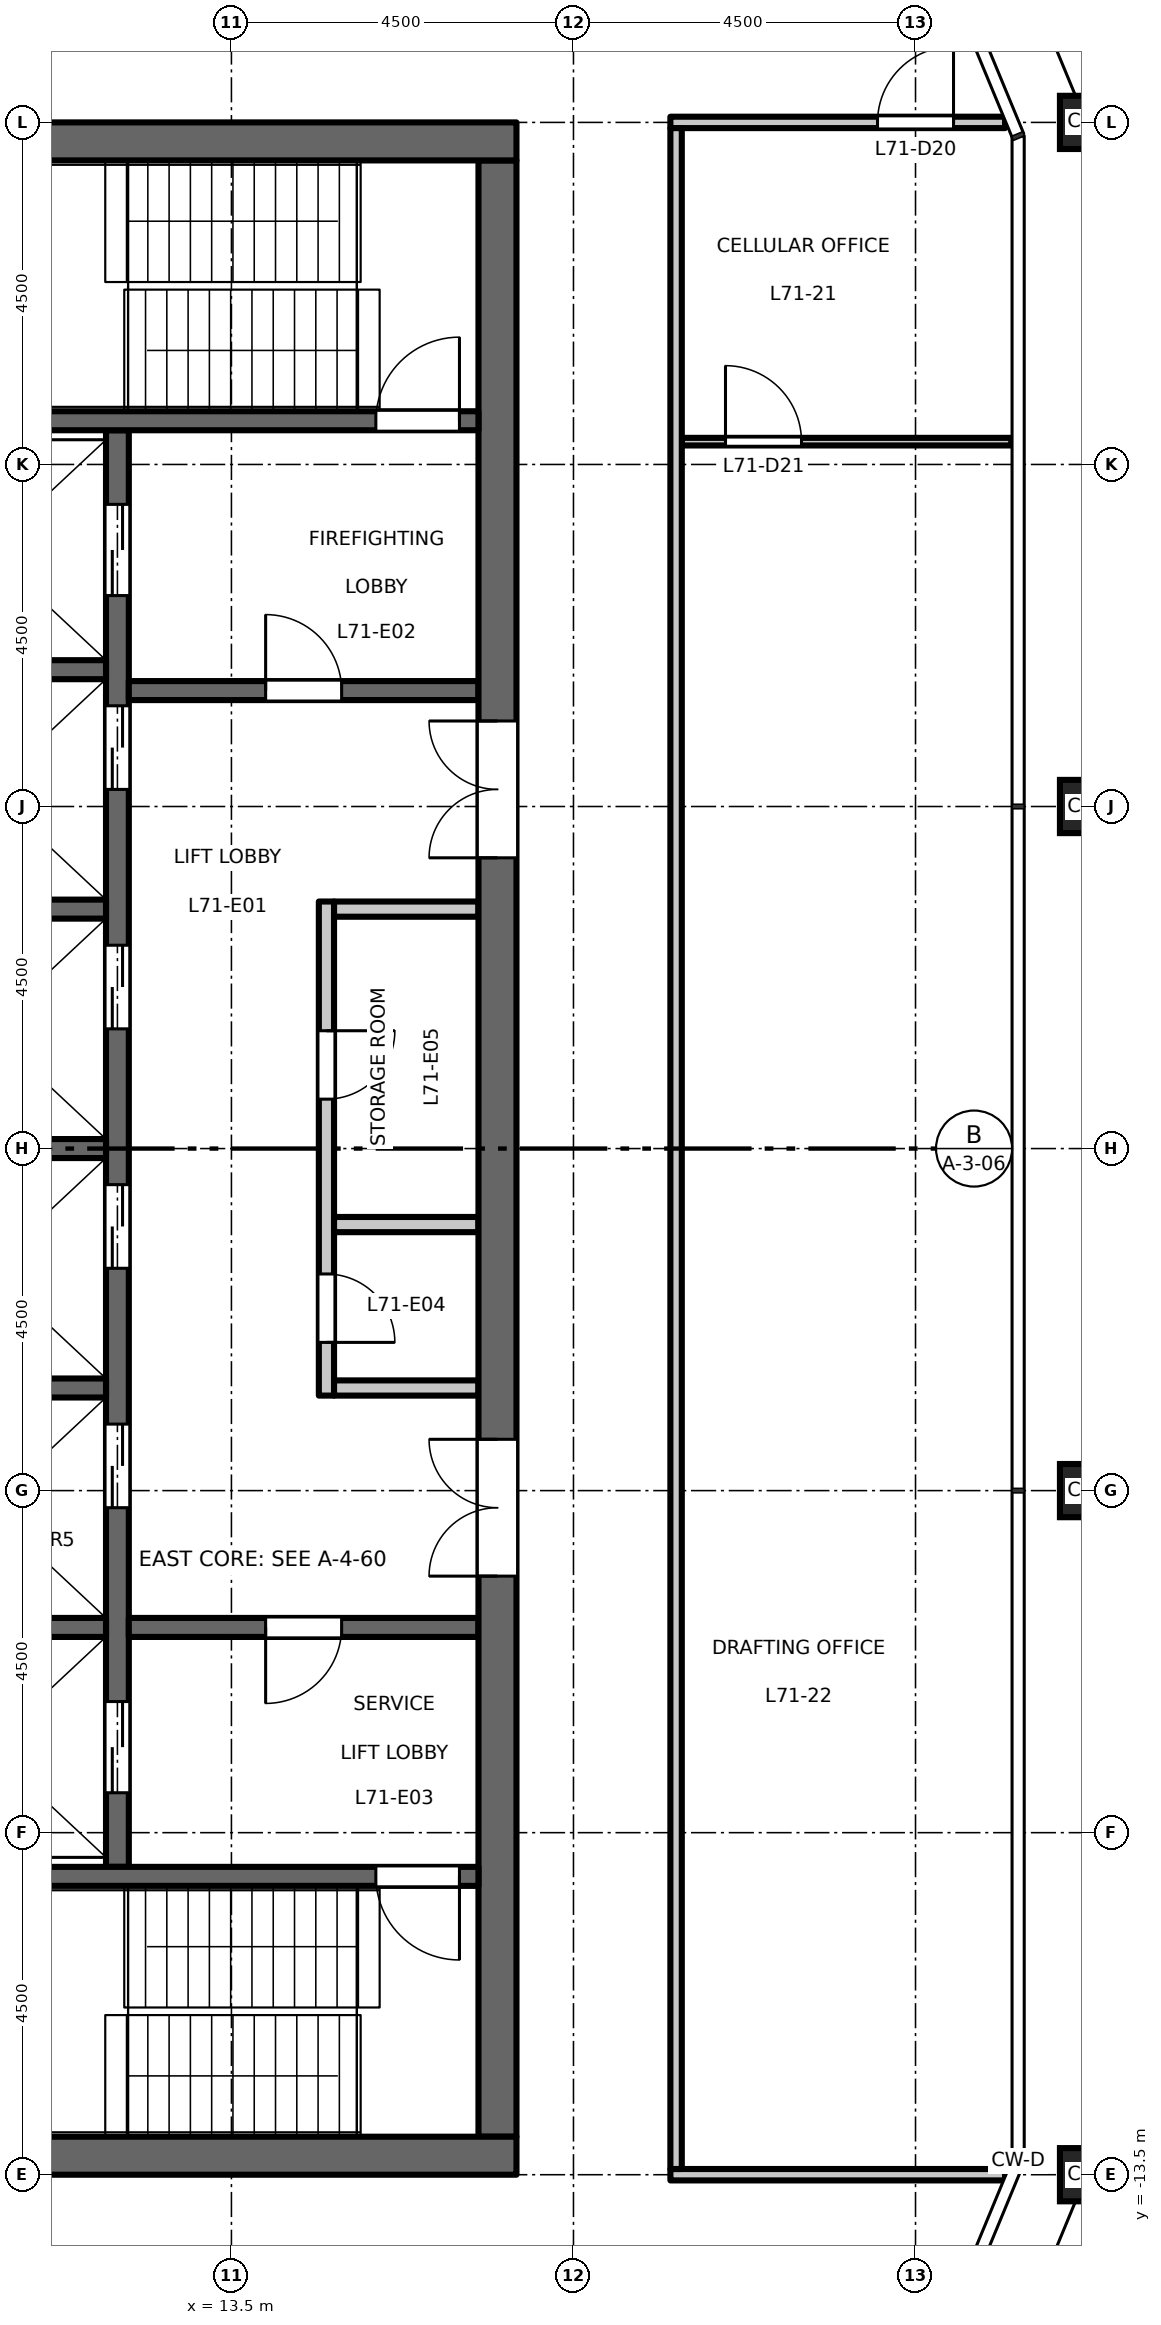
"""IFC4 building model, lengths in metres.
Left out: names, types, materials, properties, quantities, classifications, styles, units other than length and angle.
Written with IfcOpenShell. Run it as: python <this file> out.ifc"""

import sys

from ifc_helpers import new_model, si_unit, direction, frame, frame_2d, origin, origin_2d, place, context, subcontext, project, spatial, rectangle, hollow_rectangle, extrude, element, fill, save


model = new_model("IFC4")
c1 = context("Model", 3, precision=1e-05, world=origin(), true_north=direction((0.0, 1.0)))
c2 = subcontext(c1, "Body", "Model", "MODEL_VIEW")
j1 = project(units=[si_unit("LENGTHUNIT", "METRE"), si_unit("PLANEANGLEUNIT", "RADIAN")], contexts=[c1])
p1 = place(None, origin())
s1 = spatial("IfcSite", under=j1, at=p1, CompositionType="ELEMENT")
p2 = place(p1, origin())
s2 = spatial("IfcBuilding", under=s1, at=p2, CompositionType="ELEMENT")
p3 = place(p2, frame((0.0, 0.0, 330.2)))
s3 = spatial("IfcBuildingStorey", under=s2, at=p3, CompositionType="ELEMENT", Elevation=330.2)
for number, where, z_axis, x_axis in (
    (1, (24.75, -13.5, 0.0), (0.0, 0.0, 1.0), (1.0, 0.0, 0.0)),
    (2, (24.75, -4.5, 0.0), (0.0, 0.0, 1.0), (1.0, 0.0, 0.0)),
    (3, (24.75, 4.5, 0.0), (0.0, 0.0, 1.0), (1.0, 0.0, 0.0)),
    (4, (24.75, 13.5, 0.0), (0.0, 0.0, 1.0), (1.0, 0.0, 0.0)),
):
    element("IfcColumn", number, at=place(p3, frame(where, z_axis=z_axis, x_axis=x_axis)), inside=s3, PredefinedType="COLUMN", context=c2, shape_type="SweptSolid", body=[
        extrude(hollow_rectangle(XDim=0.7, YDim=0.7, WallThickness=0.036, at=origin_2d()), origin(), (0.0, 0.0, 1.0), 4.5),
    ])
p4 = place(p3, frame((14.75, -3.25, 0.0), z_axis=(0.0, 0.0, 1.0), x_axis=(0.0, 1.0, 0.0)))
e5 = element("IfcWall", 5, at=p4, inside=s3, PredefinedType="PARTITIONING", context=c2, shape_type="SweptSolid", body=[
    extrude(rectangle(XDim=6.5, YDim=0.2, at=frame_2d((3.25, 0.0))), origin(), (0.0, 0.0, 1.0), 4.35),
])
p5 = place(p4, frame((0.7, 0.0, 0.0)))
e6 = element("IfcOpeningElement", 6, at=p5, cuts=e5, PredefinedType="OPENING", context=c2, shape_type="SweptSolid", body=[
    extrude(rectangle(XDim=0.9, YDim=2.1, at=frame_2d((0.45, 1.05))), frame((0.0, 0.11, 0.0), z_axis=(0.0, -1.0, 0.0), x_axis=(1.0, 0.0, 0.0)), (0.0, 0.0, 1.0), 0.22),
])
p6 = place(p4, frame((3.9, 0.0, 0.0)))
e7 = element("IfcOpeningElement", 7, at=p6, cuts=e5, PredefinedType="OPENING", context=c2, shape_type="SweptSolid", body=[
    extrude(rectangle(XDim=0.9, YDim=2.1, at=frame_2d((0.45, 1.05))), frame((0.0, 0.11, 0.0), z_axis=(0.0, -1.0, 0.0), x_axis=(1.0, 0.0, 0.0)), (0.0, 0.0, 1.0), 0.22),
])
for number, where, z_axis, x_axis in (
    (8, (14.85, 3.15, 0.0), (0.0, 0.0, 1.0), (1.0, 0.0, 0.0)),
    (9, (14.85, -3.15, 0.0), (0.0, 0.0, 1.0), (1.0, 0.0, 0.0)),
    (10, (14.85, -1.0, 0.0), (0.0, 0.0, 1.0), (1.0, 0.0, 0.0)),
):
    element("IfcWall", number, at=place(p3, frame(where, z_axis=z_axis, x_axis=x_axis)), inside=s3, PredefinedType="PARTITIONING", context=c2, shape_type="SweptSolid", body=[
        extrude(rectangle(XDim=1.9, YDim=0.2, at=frame_2d((0.95, 0.0))), origin(), (0.0, 0.0, 1.0), 4.35),
    ])
p7 = place(p3, frame((12.0, -9.45, 0.0), z_axis=(0.0, 0.0, 1.0), x_axis=(0.0, 1.0, 0.0)))
e11 = element("IfcWall", 11, at=p7, inside=s3, PredefinedType="SHEAR", context=c2, shape_type="SweptSolid", body=[
    extrude(rectangle(XDim=18.9, YDim=0.3, at=frame_2d((9.45, 0.0))), origin(), (0.0, 0.0, 1.0), 4.35),
])
p8 = place(p7, frame((4.725, 0.0, 0.0)))
e12 = element("IfcOpeningElement", 12, at=p8, cuts=e11, PredefinedType="OPENING", context=c2, shape_type="SweptSolid", body=[
    extrude(rectangle(XDim=1.1, YDim=2.1, at=frame_2d((0.55, 1.05))), frame((0.0, 0.16, 0.0), z_axis=(0.0, -1.0, 0.0), x_axis=(1.0, 0.0, 0.0)), (0.0, 0.0, 1.0), 0.32),
])
p9 = place(p7, frame((7.875, 0.0, 0.0)))
e13 = element("IfcOpeningElement", 13, at=p9, cuts=e11, PredefinedType="OPENING", context=c2, shape_type="SweptSolid", body=[
    extrude(rectangle(XDim=1.1, YDim=2.1, at=frame_2d((0.55, 1.05))), frame((0.0, 0.16, 0.0), z_axis=(0.0, -1.0, 0.0), x_axis=(1.0, 0.0, 0.0)), (0.0, 0.0, 1.0), 0.32),
])
p10 = place(p7, frame((11.025, 0.0, 0.0)))
e14 = element("IfcOpeningElement", 14, at=p10, cuts=e11, PredefinedType="OPENING", context=c2, shape_type="SweptSolid", body=[
    extrude(rectangle(XDim=1.1, YDim=2.1, at=frame_2d((0.55, 1.05))), frame((0.0, 0.16, 0.0), z_axis=(0.0, -1.0, 0.0), x_axis=(1.0, 0.0, 0.0)), (0.0, 0.0, 1.0), 0.32),
])
p11 = place(p7, frame((14.175, 0.0, 0.0)))
e15 = element("IfcOpeningElement", 15, at=p11, cuts=e11, PredefinedType="OPENING", context=c2, shape_type="SweptSolid", body=[
    extrude(rectangle(XDim=1.1, YDim=2.1, at=frame_2d((0.55, 1.05))), frame((0.0, 0.16, 0.0), z_axis=(0.0, -1.0, 0.0), x_axis=(1.0, 0.0, 0.0)), (0.0, 0.0, 1.0), 0.32),
])
p12 = place(p7, frame((16.725, 0.0, 0.0)))
e16 = element("IfcOpeningElement", 16, at=p12, cuts=e11, PredefinedType="OPENING", context=c2, shape_type="SweptSolid", body=[
    extrude(rectangle(XDim=1.2, YDim=2.1, at=frame_2d((0.6, 1.05))), frame((0.0, 0.16, 0.0), z_axis=(0.0, -1.0, 0.0), x_axis=(1.0, 0.0, 0.0)), (0.0, 0.0, 1.0), 0.32),
])
p13 = place(p7, frame((0.975, 0.0, 0.0)))
e17 = element("IfcOpeningElement", 17, at=p13, cuts=e11, PredefinedType="OPENING", context=c2, shape_type="SweptSolid", body=[
    extrude(rectangle(XDim=1.2, YDim=2.1, at=frame_2d((0.6, 1.05))), frame((0.0, 0.16, 0.0), z_axis=(0.0, -1.0, 0.0), x_axis=(1.0, 0.0, 0.0)), (0.0, 0.0, 1.0), 0.32),
])
p14 = place(p3, frame((12.15, 6.025, 0.0), z_axis=(0.0, 0.0, 1.0), x_axis=(1.0, 0.0, 0.0)))
e18 = element("IfcWall", 18, at=p14, inside=s3, PredefinedType="SHEAR", context=c2, shape_type="SweptSolid", body=[
    extrude(rectangle(XDim=4.6, YDim=0.25, at=frame_2d((2.3, 0.0))), origin(), (0.0, 0.0, 1.0), 4.35),
])
p15 = place(p14, frame((1.8, 0.0, 0.0)))
e19 = element("IfcOpeningElement", 19, at=p15, cuts=e18, PredefinedType="OPENING", context=c2, shape_type="SweptSolid", body=[
    extrude(rectangle(XDim=1.0, YDim=2.1, at=frame_2d((0.5, 1.05))), frame((0.0, 0.135, 0.0), z_axis=(0.0, -1.0, 0.0), x_axis=(1.0, 0.0, 0.0)), (0.0, 0.0, 1.0), 0.27),
])
p16 = place(p3, frame((12.15, -6.3, 0.0), z_axis=(0.0, 0.0, 1.0), x_axis=(1.0, 0.0, 0.0)))
e20 = element("IfcWall", 20, at=p16, inside=s3, PredefinedType="SHEAR", context=c2, shape_type="SweptSolid", body=[
    extrude(rectangle(XDim=4.6, YDim=0.25, at=frame_2d((2.3, 0.0))), origin(), (0.0, 0.0, 1.0), 4.35),
])
p17 = place(p16, frame((1.8, 0.0, 0.0)))
e21 = element("IfcOpeningElement", 21, at=p17, cuts=e20, PredefinedType="OPENING", context=c2, shape_type="SweptSolid", body=[
    extrude(rectangle(XDim=1.0, YDim=2.1, at=frame_2d((0.5, 1.05))), frame((0.0, 0.135, 0.0), z_axis=(0.0, -1.0, 0.0), x_axis=(1.0, 0.0, 0.0)), (0.0, 0.0, 1.0), 0.27),
])
p18 = place(p3, frame((17.0, -13.0, 0.0), z_axis=(0.0, 0.0, 1.0), x_axis=(0.0, 1.0, 0.0)))
e22 = element("IfcWall", 22, at=p18, inside=s3, PredefinedType="SHEAR", context=c2, shape_type="SweptSolid", body=[
    extrude(rectangle(XDim=26.0, YDim=0.5, at=frame_2d((13.0, 0.0))), origin(), (0.0, 0.0, 1.0), 4.35),
])
p19 = place(p18, frame((16.825, 0.0, 0.0)))
e23 = element("IfcOpeningElement", 23, at=p19, cuts=e22, PredefinedType="OPENING", context=c2, shape_type="SweptSolid", body=[
    extrude(rectangle(XDim=1.8, YDim=2.1, at=frame_2d((0.9, 1.05))), frame((0.0, 0.26, 0.0), z_axis=(0.0, -1.0, 0.0), x_axis=(1.0, 0.0, 0.0)), (0.0, 0.0, 1.0), 0.52),
])
p20 = place(p18, frame((7.375, 0.0, 0.0)))
e24 = element("IfcOpeningElement", 24, at=p20, cuts=e22, PredefinedType="OPENING", context=c2, shape_type="SweptSolid", body=[
    extrude(rectangle(XDim=1.8, YDim=2.1, at=frame_2d((0.9, 1.05))), frame((0.0, 0.26, 0.0), z_axis=(0.0, -1.0, 0.0), x_axis=(1.0, 0.0, 0.0)), (0.0, 0.0, 1.0), 0.52),
])
for number, where, z_axis, x_axis in (
    (25, (8.75, 0.0, 0.0), (0.0, 0.0, 1.0), (1.0, 0.0, 0.0)),
    (26, (8.75, 3.15, 0.0), (0.0, 0.0, 1.0), (1.0, 0.0, 0.0)),
    (27, (8.75, 6.3, 0.0), (0.0, 0.0, 1.0), (1.0, 0.0, 0.0)),
    (28, (8.75, -3.15, 0.0), (0.0, 0.0, 1.0), (1.0, 0.0, 0.0)),
    (29, (8.75, -6.3, 0.0), (0.0, 0.0, 1.0), (1.0, 0.0, 0.0)),
):
    element("IfcWall", number, at=place(p3, frame(where, z_axis=z_axis, x_axis=x_axis)), inside=s3, PredefinedType="SHEAR", context=c2, shape_type="SweptSolid", body=[
        extrude(rectangle(XDim=3.1, YDim=0.25, at=frame_2d((1.55, 0.0))), origin(), (0.0, 0.0, 1.0), 4.35),
    ])
p21 = place(p3, frame((8.75, 9.575, 0.0), z_axis=(0.0, 0.0, 1.0), x_axis=(1.0, 0.0, 0.0)))
e30 = element("IfcWall", 30, at=p21, inside=s3, PredefinedType="SHEAR", context=c2, shape_type="SweptSolid", body=[
    extrude(rectangle(XDim=8.0, YDim=0.25, at=frame_2d((4.0, 0.0))), origin(), (0.0, 0.0, 1.0), 4.35),
])
p22 = place(p21, frame((6.65, 0.0, 0.0)))
e31 = element("IfcOpeningElement", 31, at=p22, cuts=e30, PredefinedType="OPENING", context=c2, shape_type="SweptSolid", body=[
    extrude(rectangle(XDim=1.1, YDim=2.1, at=frame_2d((0.55, 1.05))), frame((0.0, 0.135, 0.0), z_axis=(0.0, -1.0, 0.0), x_axis=(1.0, 0.0, 0.0)), (0.0, 0.0, 1.0), 0.27),
])
p23 = place(p3, frame((8.75, -9.575, 0.0), z_axis=(0.0, 0.0, 1.0), x_axis=(1.0, 0.0, 0.0)))
e32 = element("IfcWall", 32, at=p23, inside=s3, PredefinedType="SHEAR", context=c2, shape_type="SweptSolid", body=[
    extrude(rectangle(XDim=8.0, YDim=0.25, at=frame_2d((4.0, 0.0))), origin(), (0.0, 0.0, 1.0), 4.35),
])
p24 = place(p23, frame((6.65, 0.0, 0.0)))
e33 = element("IfcOpeningElement", 33, at=p24, cuts=e32, PredefinedType="OPENING", context=c2, shape_type="SweptSolid", body=[
    extrude(rectangle(XDim=1.1, YDim=2.1, at=frame_2d((0.55, 1.05))), frame((0.0, 0.135, 0.0), z_axis=(0.0, -1.0, 0.0), x_axis=(1.0, 0.0, 0.0)), (0.0, 0.0, 1.0), 0.27),
])
for number, where, z_axis, x_axis in (
    (34, (8.25, 13.25, 0.0), (0.0, 0.0, 1.0), (1.0, 0.0, 0.0)),
    (35, (8.25, -13.25, 0.0), (0.0, 0.0, 1.0), (1.0, 0.0, 0.0)),
):
    element("IfcWall", number, at=place(p3, frame(where, z_axis=z_axis, x_axis=x_axis)), inside=s3, PredefinedType="SHEAR", context=c2, shape_type="SweptSolid", body=[
        extrude(rectangle(XDim=9.0, YDim=0.5, at=frame_2d((4.5, 0.0))), origin(), (0.0, 0.0, 1.0), 4.35),
    ])
p25 = place(p3, frame((19.275, -13.5, 0.0), z_axis=(0.0, 0.0, 1.0), x_axis=(1.0, 0.0, 0.0)))
e36 = element("IfcWall", 36, at=p25, inside=s3, PredefinedType="PARTITIONING", context=c2, shape_type="SweptSolid", body=[
    extrude(rectangle(XDim=4.403, YDim=0.15, at=frame_2d((2.202, 0.0))), origin(), (0.0, 0.0, 1.0), 4.35),
])
p26 = place(p3, frame((19.425, 9.3, 0.0), z_axis=(0.0, 0.0, 1.0), x_axis=(1.0, 0.0, 0.0)))
e37 = element("IfcWall", 37, at=p26, inside=s3, PredefinedType="PARTITIONING", context=c2, shape_type="SweptSolid", body=[
    extrude(rectangle(XDim=4.335, YDim=0.1, at=frame_2d((2.167, 0.0))), origin(), (0.0, 0.0, 1.0), 4.35),
])
p27 = place(p26, frame((0.575, 0.0, 0.0)))
e38 = element("IfcOpeningElement", 38, at=p27, cuts=e37, PredefinedType="OPENING", context=c2, shape_type="SweptSolid", body=[
    extrude(rectangle(XDim=1.0, YDim=2.1, at=frame_2d((0.5, 1.05))), frame((0.0, 0.06, 0.0), z_axis=(0.0, -1.0, 0.0), x_axis=(1.0, 0.0, 0.0)), (0.0, 0.0, 1.0), 0.12),
])
p28 = place(p3, frame((19.275, 13.5, 0.0), z_axis=(0.0, 0.0, 1.0), x_axis=(1.0, 0.0, 0.0)))
e39 = element("IfcWall", 39, at=p28, inside=s3, PredefinedType="PARTITIONING", context=c2, shape_type="SweptSolid", body=[
    extrude(rectangle(XDim=4.403, YDim=0.15, at=frame_2d((2.202, 0.0))), origin(), (0.0, 0.0, 1.0), 4.35),
])
p29 = place(p28, frame((2.725, 0.0, 0.0)))
e40 = element("IfcOpeningElement", 40, at=p29, cuts=e39, PredefinedType="OPENING", context=c2, shape_type="SweptSolid", body=[
    extrude(rectangle(XDim=1.0, YDim=2.1, at=frame_2d((0.5, 1.05))), frame((0.0, 0.085, 0.0), z_axis=(0.0, -1.0, 0.0), x_axis=(1.0, 0.0, 0.0)), (0.0, 0.0, 1.0), 0.17),
])
p30 = place(p3, frame((19.35, -13.425, 0.0), z_axis=(0.0, 0.0, 1.0), x_axis=(0.0, 1.0, 0.0)))
e41 = element("IfcWall", 41, at=p30, inside=s3, PredefinedType="PARTITIONING", context=c2, shape_type="SweptSolid", body=[
    extrude(rectangle(XDim=26.85, YDim=0.15, at=frame_2d((13.425, 0.0))), origin(), (0.0, 0.0, 1.0), 4.35),
])
p31 = place(p15, origin())
e42 = element("IfcDoor", 42, at=p31, inside=s3, OperationType="SINGLE_SWING_RIGHT", PredefinedType="DOOR", context=c2, shape_type="SweptSolid", body=[
    extrude(rectangle(XDim=1.0, YDim=2.1, at=frame_2d((0.5, 1.05))), frame((0.0, 0.025, 0.0), z_axis=(0.0, -1.0, 0.0), x_axis=(1.0, 0.0, 0.0)), (0.0, 0.0, 1.0), 0.05),
])
fill(e19, e42)
p32 = place(p17, origin())
e43 = element("IfcDoor", 43, at=p32, inside=s3, OperationType="SINGLE_SWING_LEFT", PredefinedType="DOOR", context=c2, shape_type="SweptSolid", body=[
    extrude(rectangle(XDim=1.0, YDim=2.1, at=frame_2d((0.5, 1.05))), frame((0.0, 0.025, 0.0), z_axis=(0.0, -1.0, 0.0), x_axis=(1.0, 0.0, 0.0)), (0.0, 0.0, 1.0), 0.05),
])
fill(e21, e43)
p33 = place(p22, origin())
e44 = element("IfcDoor", 44, at=p33, inside=s3, OperationType="SINGLE_SWING_LEFT", PredefinedType="DOOR", context=c2, shape_type="SweptSolid", body=[
    extrude(rectangle(XDim=1.1, YDim=2.1, at=frame_2d((0.55, 1.05))), frame((0.0, 0.025, 0.0), z_axis=(0.0, -1.0, 0.0), x_axis=(1.0, 0.0, 0.0)), (0.0, 0.0, 1.0), 0.05),
])
fill(e31, e44)
p34 = place(p24, origin())
e45 = element("IfcDoor", 45, at=p34, inside=s3, OperationType="SINGLE_SWING_RIGHT", PredefinedType="DOOR", context=c2, shape_type="SweptSolid", body=[
    extrude(rectangle(XDim=1.1, YDim=2.1, at=frame_2d((0.55, 1.05))), frame((0.0, 0.025, 0.0), z_axis=(0.0, -1.0, 0.0), x_axis=(1.0, 0.0, 0.0)), (0.0, 0.0, 1.0), 0.05),
])
fill(e33, e45)
p35 = place(p19, origin())
e46 = element("IfcDoor", 46, at=p35, inside=s3, OperationType="DOUBLE_DOOR_DOUBLE_SWING", PredefinedType="DOOR", context=c2, shape_type="SweptSolid", body=[
    extrude(rectangle(XDim=1.8, YDim=2.1, at=frame_2d((0.9, 1.05))), frame((0.0, 0.025, 0.0), z_axis=(0.0, -1.0, 0.0), x_axis=(1.0, 0.0, 0.0)), (0.0, 0.0, 1.0), 0.05),
])
fill(e23, e46)
p36 = place(p20, origin())
e47 = element("IfcDoor", 47, at=p36, inside=s3, OperationType="DOUBLE_DOOR_DOUBLE_SWING", PredefinedType="DOOR", context=c2, shape_type="SweptSolid", body=[
    extrude(rectangle(XDim=1.8, YDim=2.1, at=frame_2d((0.9, 1.05))), frame((0.0, 0.025, 0.0), z_axis=(0.0, -1.0, 0.0), x_axis=(1.0, 0.0, 0.0)), (0.0, 0.0, 1.0), 0.05),
])
fill(e24, e47)
p37 = place(p8, origin())
e48 = element("IfcDoor", 48, at=p37, inside=s3, OperationType="DOUBLE_DOOR_SLIDING", PredefinedType="DOOR", context=c2, shape_type="SweptSolid", body=[
    extrude(rectangle(XDim=1.1, YDim=2.1, at=frame_2d((0.55, 1.05))), frame((0.0, 0.025, 0.0), z_axis=(0.0, -1.0, 0.0), x_axis=(1.0, 0.0, 0.0)), (0.0, 0.0, 1.0), 0.05),
])
fill(e12, e48)
p38 = place(p9, origin())
e49 = element("IfcDoor", 49, at=p38, inside=s3, OperationType="DOUBLE_DOOR_SLIDING", PredefinedType="DOOR", context=c2, shape_type="SweptSolid", body=[
    extrude(rectangle(XDim=1.1, YDim=2.1, at=frame_2d((0.55, 1.05))), frame((0.0, 0.025, 0.0), z_axis=(0.0, -1.0, 0.0), x_axis=(1.0, 0.0, 0.0)), (0.0, 0.0, 1.0), 0.05),
])
fill(e13, e49)
p39 = place(p10, origin())
e50 = element("IfcDoor", 50, at=p39, inside=s3, OperationType="DOUBLE_DOOR_SLIDING", PredefinedType="DOOR", context=c2, shape_type="SweptSolid", body=[
    extrude(rectangle(XDim=1.1, YDim=2.1, at=frame_2d((0.55, 1.05))), frame((0.0, 0.025, 0.0), z_axis=(0.0, -1.0, 0.0), x_axis=(1.0, 0.0, 0.0)), (0.0, 0.0, 1.0), 0.05),
])
fill(e14, e50)
p40 = place(p11, origin())
e51 = element("IfcDoor", 51, at=p40, inside=s3, OperationType="DOUBLE_DOOR_SLIDING", PredefinedType="DOOR", context=c2, shape_type="SweptSolid", body=[
    extrude(rectangle(XDim=1.1, YDim=2.1, at=frame_2d((0.55, 1.05))), frame((0.0, 0.025, 0.0), z_axis=(0.0, -1.0, 0.0), x_axis=(1.0, 0.0, 0.0)), (0.0, 0.0, 1.0), 0.05),
])
fill(e15, e51)
p41 = place(p12, origin())
e52 = element("IfcDoor", 52, at=p41, inside=s3, OperationType="DOUBLE_DOOR_SLIDING", PredefinedType="DOOR", context=c2, shape_type="SweptSolid", body=[
    extrude(rectangle(XDim=1.2, YDim=2.1, at=frame_2d((0.6, 1.05))), frame((0.0, 0.025, 0.0), z_axis=(0.0, -1.0, 0.0), x_axis=(1.0, 0.0, 0.0)), (0.0, 0.0, 1.0), 0.05),
])
fill(e16, e52)
p42 = place(p13, origin())
e53 = element("IfcDoor", 53, at=p42, inside=s3, OperationType="DOUBLE_DOOR_SLIDING", PredefinedType="DOOR", context=c2, shape_type="SweptSolid", body=[
    extrude(rectangle(XDim=1.2, YDim=2.1, at=frame_2d((0.6, 1.05))), frame((0.0, 0.025, 0.0), z_axis=(0.0, -1.0, 0.0), x_axis=(1.0, 0.0, 0.0)), (0.0, 0.0, 1.0), 0.05),
])
fill(e17, e53)
p43 = place(p5, origin())
e54 = element("IfcDoor", 54, at=p43, inside=s3, OperationType="SINGLE_SWING_LEFT", PredefinedType="DOOR", context=c2, shape_type="SweptSolid", body=[
    extrude(rectangle(XDim=0.9, YDim=2.1, at=frame_2d((0.45, 1.05))), frame((0.0, 0.025, 0.0), z_axis=(0.0, -1.0, 0.0), x_axis=(1.0, 0.0, 0.0)), (0.0, 0.0, 1.0), 0.05),
])
fill(e6, e54)
p44 = place(p6, origin())
e55 = element("IfcDoor", 55, at=p44, inside=s3, OperationType="SINGLE_SWING_RIGHT", PredefinedType="DOOR", context=c2, shape_type="SweptSolid", body=[
    extrude(rectangle(XDim=0.9, YDim=2.1, at=frame_2d((0.45, 1.05))), frame((0.0, 0.025, 0.0), z_axis=(0.0, -1.0, 0.0), x_axis=(1.0, 0.0, 0.0)), (0.0, 0.0, 1.0), 0.05),
])
fill(e7, e55)
p45 = place(p29, origin())
e56 = element("IfcDoor", 56, at=p45, inside=s3, OperationType="SINGLE_SWING_RIGHT", PredefinedType="DOOR", context=c2, shape_type="SweptSolid", body=[
    extrude(rectangle(XDim=1.0, YDim=2.1, at=frame_2d((0.5, 1.05))), frame((0.0, 0.025, 0.0), z_axis=(0.0, -1.0, 0.0), x_axis=(1.0, 0.0, 0.0)), (0.0, 0.0, 1.0), 0.05),
])
fill(e40, e56)
p46 = place(p27, origin())
e57 = element("IfcDoor", 57, at=p46, inside=s3, OperationType="SINGLE_SWING_LEFT", PredefinedType="DOOR", context=c2, shape_type="SweptSolid", body=[
    extrude(rectangle(XDim=1.0, YDim=2.1, at=frame_2d((0.5, 1.05))), frame((0.0, 0.025, 0.0), z_axis=(0.0, -1.0, 0.0), x_axis=(1.0, 0.0, 0.0)), (0.0, 0.0, 1.0), 0.05),
])
fill(e38, e57)
save(model, sys.argv[1])
